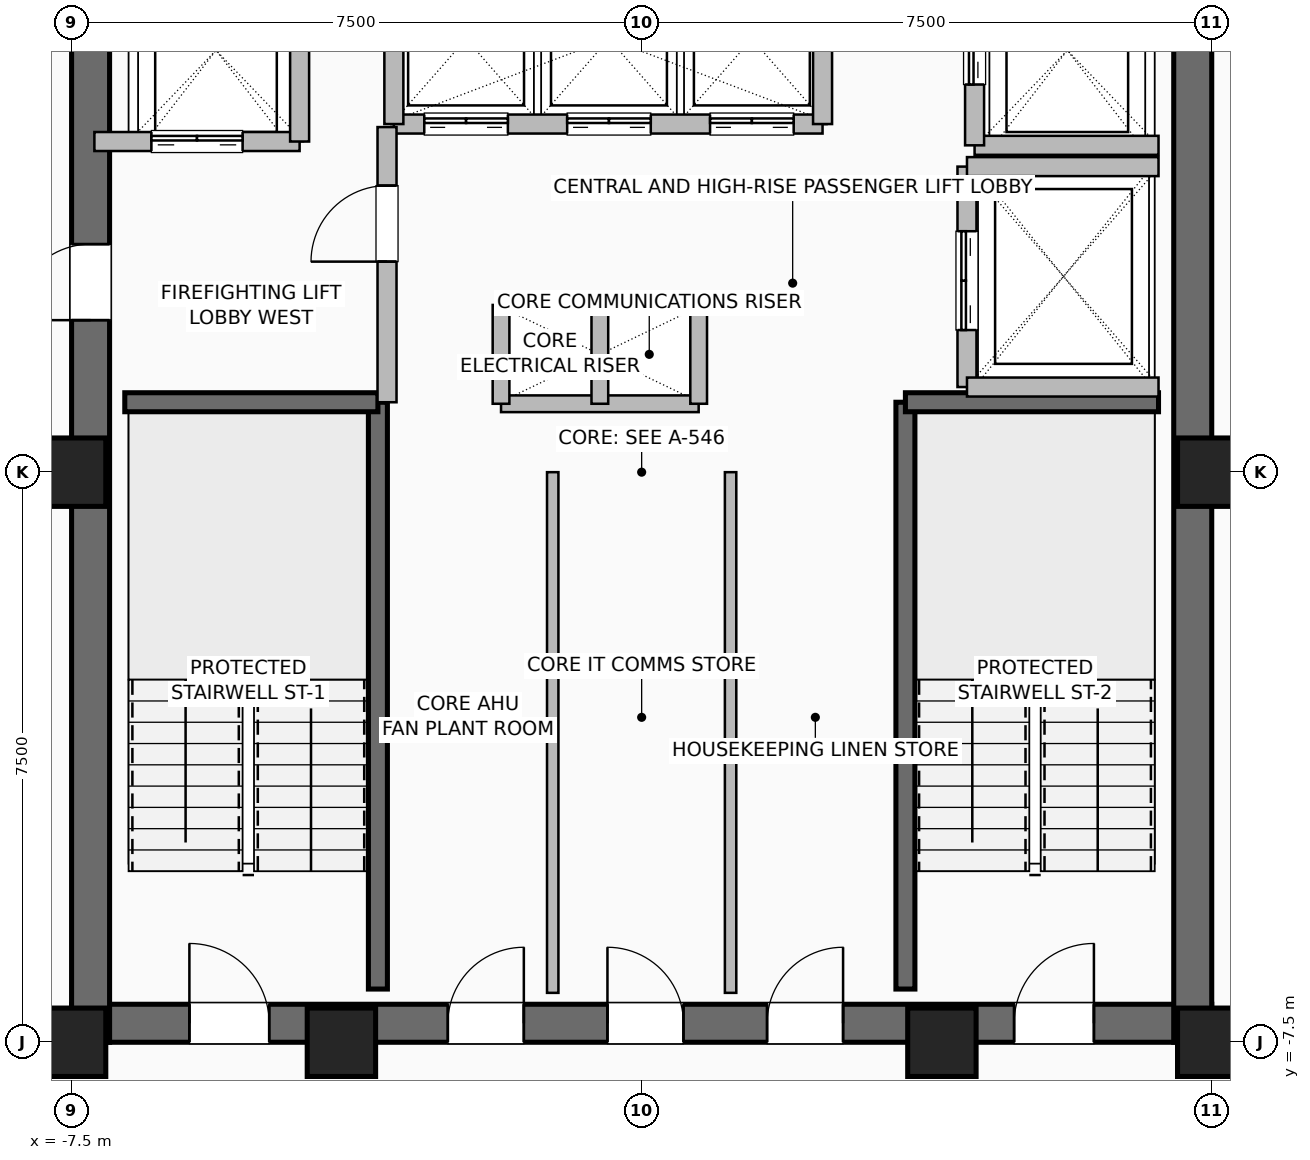
"""IFC4 building model, lengths in metres.
Left out: names, types, materials, properties, quantities, classifications, styles, units other than length and angle.
Written with IfcOpenShell. Run it as: python <this file> out.ifc"""

import sys

from ifc_helpers import new_model, si_unit, direction, frame, frame_2d, origin, origin_2d, place, context, subcontext, project, spatial, rectangle, hollow_rectangle, extrude, element, fill, save


model = new_model("IFC4")
c1 = context("Model", 3, precision=1e-05, world=origin(), true_north=direction((0.0, 1.0)))
c2 = subcontext(c1, "Body", "Model", "MODEL_VIEW")
j1 = project(units=[si_unit("LENGTHUNIT", "METRE"), si_unit("PLANEANGLEUNIT", "RADIAN")], contexts=[c1])
p1 = place(None, origin())
s1 = spatial("IfcSite", under=j1, at=p1, CompositionType="ELEMENT")
p2 = place(p1, origin())
s2 = spatial("IfcBuilding", under=s1, at=p2, CompositionType="ELEMENT")
p3 = place(p2, frame((0.0, 0.0, 177.0)))
s3 = spatial("IfcBuildingStorey", under=s2, at=p3, CompositionType="ELEMENT", Elevation=177.0)
for number, where, z_axis, x_axis in (
    (1, (-7.5, -7.5, 0.0), (0.0, 0.0, 1.0), (1.0, 0.0, 0.0)),
    (2, (-3.95, -7.5, 0.0), (0.0, 0.0, 1.0), (1.0, 0.0, 0.0)),
    (3, (3.95, -7.5, 0.0), (0.0, 0.0, 1.0), (1.0, 0.0, 0.0)),
    (4, (7.5, -7.5, 0.0), (0.0, 0.0, 1.0), (1.0, 0.0, 0.0)),
    (5, (7.5, 0.0, 0.0), (0.0, 0.0, 1.0), (1.0, 0.0, 0.0)),
    (6, (-7.5, 0.0, 0.0), (0.0, 0.0, 1.0), (1.0, 0.0, 0.0)),
):
    element("IfcColumn", number, at=place(p3, frame(where, z_axis=z_axis, x_axis=x_axis)), inside=s3, PredefinedType="COLUMN", context=c2, shape_type="SweptSolid", body=[
        extrude(hollow_rectangle(XDim=0.9, YDim=0.9, WallThickness=0.045, at=origin_2d()), origin(), (0.0, 0.0, 1.0), 3.6),
    ])
p4 = place(p3, frame((-7.5, -7.25, 0.0), z_axis=(0.0, 0.0, 1.0), x_axis=(1.0, 0.0, 0.0)))
e7 = element("IfcWall", 7, at=p4, inside=s3, PredefinedType="SHEAR", context=c2, shape_type="SweptSolid", body=[
    extrude(rectangle(XDim=15.0, YDim=0.5, at=frame_2d((7.5, 0.0))), origin(), (0.0, 0.0, 1.0), 3.36),
])
p5 = place(p4, frame((1.55, 0.0, 0.0)))
e8 = element("IfcOpeningElement", 8, at=p5, cuts=e7, PredefinedType="OPENING", context=c2, shape_type="SweptSolid", body=[
    extrude(rectangle(XDim=1.05, YDim=2.08, at=frame_2d((0.525, 1.04))), frame((0.0, 0.26, 0.0), z_axis=(0.0, -1.0, 0.0), x_axis=(1.0, 0.0, 0.0)), (0.0, 0.0, 1.0), 0.52),
])
p6 = place(p4, frame((12.4, 0.0, 0.0)))
e9 = element("IfcOpeningElement", 9, at=p6, cuts=e7, PredefinedType="OPENING", context=c2, shape_type="SweptSolid", body=[
    extrude(rectangle(XDim=1.05, YDim=2.08, at=frame_2d((0.525, 1.04))), frame((0.0, 0.26, 0.0), z_axis=(0.0, -1.0, 0.0), x_axis=(1.0, 0.0, 0.0)), (0.0, 0.0, 1.0), 0.52),
])
p7 = place(p4, frame((4.95, 0.0, 0.0)))
e10 = element("IfcOpeningElement", 10, at=p7, cuts=e7, PredefinedType="OPENING", context=c2, shape_type="SweptSolid", body=[
    extrude(rectangle(XDim=1.0, YDim=2.08, at=frame_2d((0.5, 1.04))), frame((0.0, 0.26, 0.0), z_axis=(0.0, -1.0, 0.0), x_axis=(1.0, 0.0, 0.0)), (0.0, 0.0, 1.0), 0.52),
])
p8 = place(p4, frame((7.05, 0.0, 0.0)))
e11 = element("IfcOpeningElement", 11, at=p8, cuts=e7, PredefinedType="OPENING", context=c2, shape_type="SweptSolid", body=[
    extrude(rectangle(XDim=1.0, YDim=2.08, at=frame_2d((0.5, 1.04))), frame((0.0, 0.26, 0.0), z_axis=(0.0, -1.0, 0.0), x_axis=(1.0, 0.0, 0.0)), (0.0, 0.0, 1.0), 0.52),
])
p9 = place(p4, frame((9.15, 0.0, 0.0)))
e12 = element("IfcOpeningElement", 12, at=p9, cuts=e7, PredefinedType="OPENING", context=c2, shape_type="SweptSolid", body=[
    extrude(rectangle(XDim=1.0, YDim=2.08, at=frame_2d((0.5, 1.04))), frame((0.0, 0.26, 0.0), z_axis=(0.0, -1.0, 0.0), x_axis=(1.0, 0.0, 0.0)), (0.0, 0.0, 1.0), 0.52),
])
p10 = place(p3, frame((-7.25, -7.5, 0.0), z_axis=(0.0, 0.0, 1.0), x_axis=(0.0, 1.0, 0.0)))
e13 = element("IfcWall", 13, at=p10, inside=s3, PredefinedType="SHEAR", context=c2, shape_type="SweptSolid", body=[
    extrude(rectangle(XDim=15.0, YDim=0.5, at=frame_2d((7.5, 0.0))), origin(), (0.0, 0.0, 1.0), 3.36),
])
p11 = place(p10, frame((9.5, 0.0, 0.0)))
e14 = element("IfcOpeningElement", 14, at=p11, cuts=e13, PredefinedType="OPENING", context=c2, shape_type="SweptSolid", body=[
    extrude(rectangle(XDim=1.0, YDim=2.08, at=frame_2d((0.5, 1.04))), frame((0.0, 0.26, 0.0), z_axis=(0.0, -1.0, 0.0), x_axis=(1.0, 0.0, 0.0)), (0.0, 0.0, 1.0), 0.52),
])
p12 = place(p3, frame((7.25, -7.5, 0.0), z_axis=(0.0, 0.0, 1.0), x_axis=(0.0, 1.0, 0.0)))
e15 = element("IfcWall", 15, at=p12, inside=s3, PredefinedType="SHEAR", context=c2, shape_type="SweptSolid", body=[
    extrude(rectangle(XDim=15.0, YDim=0.5, at=frame_2d((7.5, 0.0))), origin(), (0.0, 0.0, 1.0), 3.36),
])
p13 = place(p3, frame((-3.47, -6.8, 0.0), z_axis=(0.0, 0.0, 1.0), x_axis=(0.0, 1.0, 0.0)))
e16 = element("IfcWall", 16, at=p13, inside=s3, PredefinedType="SHEAR", context=c2, shape_type="SweptSolid", body=[
    extrude(rectangle(XDim=7.72, YDim=0.25, at=frame_2d((3.86, 0.0))), origin(), (0.0, 0.0, 1.0), 3.36),
])
p14 = place(p3, frame((-6.8, 0.92, 0.0), z_axis=(0.0, 0.0, 1.0), x_axis=(1.0, 0.0, 0.0)))
e17 = element("IfcWall", 17, at=p14, inside=s3, PredefinedType="SHEAR", context=c2, shape_type="SweptSolid", body=[
    extrude(rectangle(XDim=3.33, YDim=0.25, at=frame_2d((1.665, 0.0))), origin(), (0.0, 0.0, 1.0), 3.36),
])
p15 = place(p3, frame((3.47, -6.8, 0.0), z_axis=(0.0, 0.0, 1.0), x_axis=(0.0, 1.0, 0.0)))
e18 = element("IfcWall", 18, at=p15, inside=s3, PredefinedType="SHEAR", context=c2, shape_type="SweptSolid", body=[
    extrude(rectangle(XDim=7.72, YDim=0.25, at=frame_2d((3.86, 0.0))), origin(), (0.0, 0.0, 1.0), 3.36),
])
p16 = place(p3, frame((3.47, 0.92, 0.0), z_axis=(0.0, 0.0, 1.0), x_axis=(1.0, 0.0, 0.0)))
e19 = element("IfcWall", 19, at=p16, inside=s3, PredefinedType="SHEAR", context=c2, shape_type="SweptSolid", body=[
    extrude(rectangle(XDim=3.33, YDim=0.25, at=frame_2d((1.665, 0.0))), origin(), (0.0, 0.0, 1.0), 3.36),
])
for number, where, z_axis, x_axis in (
    (20, (-1.85, 2.2, 0.0), (0.0, 0.0, 1.0), (1.0, 0.0, 0.0)),
    (21, (-1.85, 0.9, 0.0), (0.0, 0.0, 1.0), (1.0, 0.0, 0.0)),
):
    element("IfcWall", number, at=place(p3, frame(where, z_axis=z_axis, x_axis=x_axis)), inside=s3, PredefinedType="PARTITIONING", context=c2, shape_type="SweptSolid", body=[
        extrude(rectangle(XDim=2.6, YDim=0.22, at=frame_2d((1.3, 0.0))), origin(), (0.0, 0.0, 1.0), 3.36),
    ])
for number, where, z_axis, x_axis in (
    (22, (-0.55, 0.9, 0.0), (0.0, 0.0, 1.0), (0.0, 1.0, 0.0)),
    (23, (0.75, 0.9, 0.0), (0.0, 0.0, 1.0), (0.0, 1.0, 0.0)),
    (24, (-1.85, 0.9, 0.0), (0.0, 0.0, 1.0), (0.0, 1.0, 0.0)),
):
    element("IfcWall", number, at=place(p3, frame(where, z_axis=z_axis, x_axis=x_axis)), inside=s3, PredefinedType="PARTITIONING", context=c2, shape_type="SweptSolid", body=[
        extrude(rectangle(XDim=1.3, YDim=0.22, at=frame_2d((0.65, 0.0))), origin(), (0.0, 0.0, 1.0), 3.36),
    ])
p17 = place(p3, frame((-3.26, 4.58, 0.0), z_axis=(0.0, 0.0, 1.0), x_axis=(1.0, 0.0, 0.0)))
e25 = element("IfcWall", 25, at=p17, inside=s3, PredefinedType="SHEAR", context=c2, shape_type="SweptSolid", body=[
    extrude(rectangle(XDim=5.64, YDim=0.25, at=frame_2d((2.82, 0.0))), origin(), (0.0, 0.0, 1.0), 3.36),
])
p18 = place(p17, frame((0.4, 0.0, 0.0)))
e26 = element("IfcOpeningElement", 26, at=p18, cuts=e25, PredefinedType="OPENING", context=c2, shape_type="SweptSolid", body=[
    extrude(rectangle(XDim=1.1, YDim=2.2, at=frame_2d((0.55, 1.1))), frame((0.0, 0.135, 0.0), z_axis=(0.0, -1.0, 0.0), x_axis=(1.0, 0.0, 0.0)), (0.0, 0.0, 1.0), 0.27),
])
p19 = place(p17, frame((2.28, 0.0, 0.0)))
e27 = element("IfcOpeningElement", 27, at=p19, cuts=e25, PredefinedType="OPENING", context=c2, shape_type="SweptSolid", body=[
    extrude(rectangle(XDim=1.1, YDim=2.2, at=frame_2d((0.55, 1.1))), frame((0.0, 0.135, 0.0), z_axis=(0.0, -1.0, 0.0), x_axis=(1.0, 0.0, 0.0)), (0.0, 0.0, 1.0), 0.27),
])
p20 = place(p17, frame((4.16, 0.0, 0.0)))
e28 = element("IfcOpeningElement", 28, at=p20, cuts=e25, PredefinedType="OPENING", context=c2, shape_type="SweptSolid", body=[
    extrude(rectangle(XDim=1.1, YDim=2.2, at=frame_2d((0.55, 1.1))), frame((0.0, 0.135, 0.0), z_axis=(0.0, -1.0, 0.0), x_axis=(1.0, 0.0, 0.0)), (0.0, 0.0, 1.0), 0.27),
])
for number, where, z_axis, x_axis in (
    (29, (-3.26, 4.58, 0.0), (0.0, 0.0, 1.0), (0.0, 1.0, 0.0)),
    (30, (2.38, 4.58, 0.0), (0.0, 0.0, 1.0), (0.0, 1.0, 0.0)),
):
    element("IfcWall", number, at=place(p3, frame(where, z_axis=z_axis, x_axis=x_axis)), inside=s3, PredefinedType="SHEAR", context=c2, shape_type="SweptSolid", body=[
        extrude(rectangle(XDim=2.22, YDim=0.25, at=frame_2d((1.11, 0.0))), origin(), (0.0, 0.0, 1.0), 3.36),
    ])
p21 = place(p3, frame((-7.2, 4.35, 0.0), z_axis=(0.0, 0.0, 1.0), x_axis=(1.0, 0.0, 0.0)))
e31 = element("IfcWall", 31, at=p21, inside=s3, PredefinedType="SHEAR", context=c2, shape_type="SweptSolid", body=[
    extrude(rectangle(XDim=2.7, YDim=0.25, at=frame_2d((1.35, 0.0))), origin(), (0.0, 0.0, 1.0), 3.36),
])
p22 = place(p21, frame((0.75, 0.0, 0.0)))
e32 = element("IfcOpeningElement", 32, at=p22, cuts=e31, PredefinedType="OPENING", context=c2, shape_type="SweptSolid", body=[
    extrude(rectangle(XDim=1.2, YDim=2.2, at=frame_2d((0.6, 1.1))), frame((0.0, 0.135, 0.0), z_axis=(0.0, -1.0, 0.0), x_axis=(1.0, 0.0, 0.0)), (0.0, 0.0, 1.0), 0.27),
])
p23 = place(p3, frame((-4.5, 4.35, 0.0), z_axis=(0.0, 0.0, 1.0), x_axis=(0.0, 1.0, 0.0)))
e33 = element("IfcWall", 33, at=p23, inside=s3, PredefinedType="SHEAR", context=c2, shape_type="SweptSolid", body=[
    extrude(rectangle(XDim=2.85, YDim=0.25, at=frame_2d((1.425, 0.0))), origin(), (0.0, 0.0, 1.0), 3.36),
])
p24 = place(p3, frame((4.38, 4.3, 0.0), z_axis=(0.0, 0.0, 1.0), x_axis=(1.0, 0.0, 0.0)))
e34 = element("IfcWall", 34, at=p24, inside=s3, PredefinedType="SHEAR", context=c2, shape_type="SweptSolid", body=[
    extrude(rectangle(XDim=2.42, YDim=0.25, at=frame_2d((1.21, 0.0))), origin(), (0.0, 0.0, 1.0), 3.36),
])
p25 = place(p3, frame((4.38, 4.3, 0.0), z_axis=(0.0, 0.0, 1.0), x_axis=(0.0, 1.0, 0.0)))
e35 = element("IfcWall", 35, at=p25, inside=s3, PredefinedType="SHEAR", context=c2, shape_type="SweptSolid", body=[
    extrude(rectangle(XDim=2.5, YDim=0.25, at=frame_2d((1.25, 0.0))), origin(), (0.0, 0.0, 1.0), 3.36),
])
p26 = place(p25, frame((0.8, 0.0, 0.0)))
e36 = element("IfcOpeningElement", 36, at=p26, cuts=e35, PredefinedType="OPENING", context=c2, shape_type="SweptSolid", body=[
    extrude(rectangle(XDim=1.2, YDim=2.2, at=frame_2d((0.6, 1.1))), frame((0.0, 0.135, 0.0), z_axis=(0.0, -1.0, 0.0), x_axis=(1.0, 0.0, 0.0)), (0.0, 0.0, 1.0), 0.27),
])
p27 = place(p3, frame((4.28, 1.12, 0.0), z_axis=(0.0, 0.0, 1.0), x_axis=(0.0, 1.0, 0.0)))
e37 = element("IfcWall", 37, at=p27, inside=s3, PredefinedType="SHEAR", context=c2, shape_type="SweptSolid", body=[
    extrude(rectangle(XDim=2.9, YDim=0.25, at=frame_2d((1.45, 0.0))), origin(), (0.0, 0.0, 1.0), 3.36),
])
p28 = place(p27, frame((0.75, 0.0, 0.0)))
e38 = element("IfcOpeningElement", 38, at=p28, cuts=e37, PredefinedType="OPENING", context=c2, shape_type="SweptSolid", body=[
    extrude(rectangle(XDim=1.3, YDim=2.3, at=frame_2d((0.65, 1.15))), frame((0.0, 0.135, 0.0), z_axis=(0.0, -1.0, 0.0), x_axis=(1.0, 0.0, 0.0)), (0.0, 0.0, 1.0), 0.27),
])
for number, where, z_axis, x_axis in (
    (39, (4.28, 1.12, 0.0), (0.0, 0.0, 1.0), (1.0, 0.0, 0.0)),
    (40, (4.28, 4.02, 0.0), (0.0, 0.0, 1.0), (1.0, 0.0, 0.0)),
):
    element("IfcWall", number, at=place(p3, frame(where, z_axis=z_axis, x_axis=x_axis)), inside=s3, PredefinedType="SHEAR", context=c2, shape_type="SweptSolid", body=[
        extrude(rectangle(XDim=2.52, YDim=0.25, at=frame_2d((1.26, 0.0))), origin(), (0.0, 0.0, 1.0), 3.36),
    ])
p29 = place(p3, frame((-3.35, 0.92, 0.0), z_axis=(0.0, 0.0, 1.0), x_axis=(0.0, 1.0, 0.0)))
e41 = element("IfcWall", 41, at=p29, inside=s3, PredefinedType="SHEAR", context=c2, shape_type="SweptSolid", body=[
    extrude(rectangle(XDim=3.62, YDim=0.25, at=frame_2d((1.81, 0.0))), origin(), (0.0, 0.0, 1.0), 3.36),
])
p30 = place(p29, frame((1.85, 0.0, 0.0)))
e42 = element("IfcOpeningElement", 42, at=p30, cuts=e41, PredefinedType="OPENING", context=c2, shape_type="SweptSolid", body=[
    extrude(rectangle(XDim=1.0, YDim=2.08, at=frame_2d((0.5, 1.04))), frame((0.0, 0.135, 0.0), z_axis=(0.0, -1.0, 0.0), x_axis=(1.0, 0.0, 0.0)), (0.0, 0.0, 1.0), 0.27),
])
for number, where, z_axis, x_axis in (
    (43, (-1.17, -6.85, 0.0), (0.0, 0.0, 1.0), (0.0, 1.0, 0.0)),
    (44, (1.17, -6.85, 0.0), (0.0, 0.0, 1.0), (0.0, 1.0, 0.0)),
):
    element("IfcWall", number, at=place(p3, frame(where, z_axis=z_axis, x_axis=x_axis)), inside=s3, PredefinedType="PARTITIONING", context=c2, shape_type="SweptSolid", body=[
        extrude(rectangle(XDim=6.85, YDim=0.15, at=frame_2d((3.425, 0.0))), origin(), (0.0, 0.0, 1.0), 3.36),
    ])
p31 = place(p3, frame((7.45, -7.48, 0.0), z_axis=(0.0, 0.0, 1.0), x_axis=(1.0, 0.0, 0.0)))
e45 = element("IfcWall", 45, at=p31, inside=s3, PredefinedType="PARTITIONING", context=c2, shape_type="SweptSolid", body=[
    extrude(rectangle(XDim=0.95, YDim=0.15, at=frame_2d((0.475, 0.0))), origin(), (0.0, 0.0, 1.0), 3.36),
])
p32 = place(p5, origin())
e46 = element("IfcDoor", 46, at=p32, inside=s3, OperationType="SINGLE_SWING_LEFT", PredefinedType="DOOR", context=c2, shape_type="SweptSolid", body=[
    extrude(rectangle(XDim=1.05, YDim=2.08, at=frame_2d((0.525, 1.04))), frame((0.0, 0.025, 0.0), z_axis=(0.0, -1.0, 0.0), x_axis=(1.0, 0.0, 0.0)), (0.0, 0.0, 1.0), 0.05),
])
fill(e8, e46)
p33 = place(p6, origin())
e47 = element("IfcDoor", 47, at=p33, inside=s3, OperationType="SINGLE_SWING_RIGHT", PredefinedType="DOOR", context=c2, shape_type="SweptSolid", body=[
    extrude(rectangle(XDim=1.05, YDim=2.08, at=frame_2d((0.525, 1.04))), frame((0.0, 0.025, 0.0), z_axis=(0.0, -1.0, 0.0), x_axis=(1.0, 0.0, 0.0)), (0.0, 0.0, 1.0), 0.05),
])
fill(e9, e47)
p34 = place(p11, origin())
e48 = element("IfcDoor", 48, at=p34, inside=s3, OperationType="SINGLE_SWING_LEFT", PredefinedType="DOOR", context=c2, shape_type="SweptSolid", body=[
    extrude(rectangle(XDim=1.0, YDim=2.08, at=frame_2d((0.5, 1.04))), frame((0.0, 0.025, 0.0), z_axis=(0.0, -1.0, 0.0), x_axis=(1.0, 0.0, 0.0)), (0.0, 0.0, 1.0), 0.05),
])
fill(e14, e48)
p35 = place(p7, origin())
e49 = element("IfcDoor", 49, at=p35, inside=s3, OperationType="SINGLE_SWING_RIGHT", PredefinedType="DOOR", context=c2, shape_type="SweptSolid", body=[
    extrude(rectangle(XDim=1.0, YDim=2.08, at=frame_2d((0.5, 1.04))), frame((0.0, 0.025, 0.0), z_axis=(0.0, -1.0, 0.0), x_axis=(1.0, 0.0, 0.0)), (0.0, 0.0, 1.0), 0.05),
])
fill(e10, e49)
p36 = place(p8, origin())
e50 = element("IfcDoor", 50, at=p36, inside=s3, OperationType="SINGLE_SWING_LEFT", PredefinedType="DOOR", context=c2, shape_type="SweptSolid", body=[
    extrude(rectangle(XDim=1.0, YDim=2.08, at=frame_2d((0.5, 1.04))), frame((0.0, 0.025, 0.0), z_axis=(0.0, -1.0, 0.0), x_axis=(1.0, 0.0, 0.0)), (0.0, 0.0, 1.0), 0.05),
])
fill(e11, e50)
p37 = place(p9, origin())
e51 = element("IfcDoor", 51, at=p37, inside=s3, OperationType="SINGLE_SWING_RIGHT", PredefinedType="DOOR", context=c2, shape_type="SweptSolid", body=[
    extrude(rectangle(XDim=1.0, YDim=2.08, at=frame_2d((0.5, 1.04))), frame((0.0, 0.025, 0.0), z_axis=(0.0, -1.0, 0.0), x_axis=(1.0, 0.0, 0.0)), (0.0, 0.0, 1.0), 0.05),
])
fill(e12, e51)
p38 = place(p18, origin())
e52 = element("IfcDoor", 52, at=p38, inside=s3, OperationType="DOUBLE_DOOR_SLIDING", PredefinedType="DOOR", context=c2, shape_type="SweptSolid", body=[
    extrude(rectangle(XDim=1.1, YDim=2.2, at=frame_2d((0.55, 1.1))), frame((0.0, 0.025, 0.0), z_axis=(0.0, -1.0, 0.0), x_axis=(1.0, 0.0, 0.0)), (0.0, 0.0, 1.0), 0.05),
])
fill(e26, e52)
p39 = place(p19, origin())
e53 = element("IfcDoor", 53, at=p39, inside=s3, OperationType="DOUBLE_DOOR_SLIDING", PredefinedType="DOOR", context=c2, shape_type="SweptSolid", body=[
    extrude(rectangle(XDim=1.1, YDim=2.2, at=frame_2d((0.55, 1.1))), frame((0.0, 0.025, 0.0), z_axis=(0.0, -1.0, 0.0), x_axis=(1.0, 0.0, 0.0)), (0.0, 0.0, 1.0), 0.05),
])
fill(e27, e53)
p40 = place(p20, origin())
e54 = element("IfcDoor", 54, at=p40, inside=s3, OperationType="DOUBLE_DOOR_SLIDING", PredefinedType="DOOR", context=c2, shape_type="SweptSolid", body=[
    extrude(rectangle(XDim=1.1, YDim=2.2, at=frame_2d((0.55, 1.1))), frame((0.0, 0.025, 0.0), z_axis=(0.0, -1.0, 0.0), x_axis=(1.0, 0.0, 0.0)), (0.0, 0.0, 1.0), 0.05),
])
fill(e28, e54)
p41 = place(p22, origin())
e55 = element("IfcDoor", 55, at=p41, inside=s3, OperationType="DOUBLE_DOOR_SLIDING", PredefinedType="DOOR", context=c2, shape_type="SweptSolid", body=[
    extrude(rectangle(XDim=1.2, YDim=2.2, at=frame_2d((0.6, 1.1))), frame((0.0, 0.025, 0.0), z_axis=(0.0, -1.0, 0.0), x_axis=(1.0, 0.0, 0.0)), (0.0, 0.0, 1.0), 0.05),
])
fill(e32, e55)
p42 = place(p26, origin())
e56 = element("IfcDoor", 56, at=p42, inside=s3, OperationType="DOUBLE_DOOR_SLIDING", PredefinedType="DOOR", context=c2, shape_type="SweptSolid", body=[
    extrude(rectangle(XDim=1.2, YDim=2.2, at=frame_2d((0.6, 1.1))), frame((0.0, 0.025, 0.0), z_axis=(0.0, -1.0, 0.0), x_axis=(1.0, 0.0, 0.0)), (0.0, 0.0, 1.0), 0.05),
])
fill(e36, e56)
p43 = place(p28, origin())
e57 = element("IfcDoor", 57, at=p43, inside=s3, OperationType="DOUBLE_DOOR_SLIDING", PredefinedType="DOOR", context=c2, shape_type="SweptSolid", body=[
    extrude(rectangle(XDim=1.3, YDim=2.3, at=frame_2d((0.65, 1.15))), frame((0.0, 0.025, 0.0), z_axis=(0.0, -1.0, 0.0), x_axis=(1.0, 0.0, 0.0)), (0.0, 0.0, 1.0), 0.05),
])
fill(e38, e57)
p44 = place(p30, origin())
e58 = element("IfcDoor", 58, at=p44, inside=s3, OperationType="SINGLE_SWING_LEFT", PredefinedType="DOOR", context=c2, shape_type="SweptSolid", body=[
    extrude(rectangle(XDim=1.0, YDim=2.08, at=frame_2d((0.5, 1.04))), frame((0.0, 0.025, 0.0), z_axis=(0.0, -1.0, 0.0), x_axis=(1.0, 0.0, 0.0)), (0.0, 0.0, 1.0), 0.05),
])
fill(e42, e58)
save(model, sys.argv[1])
